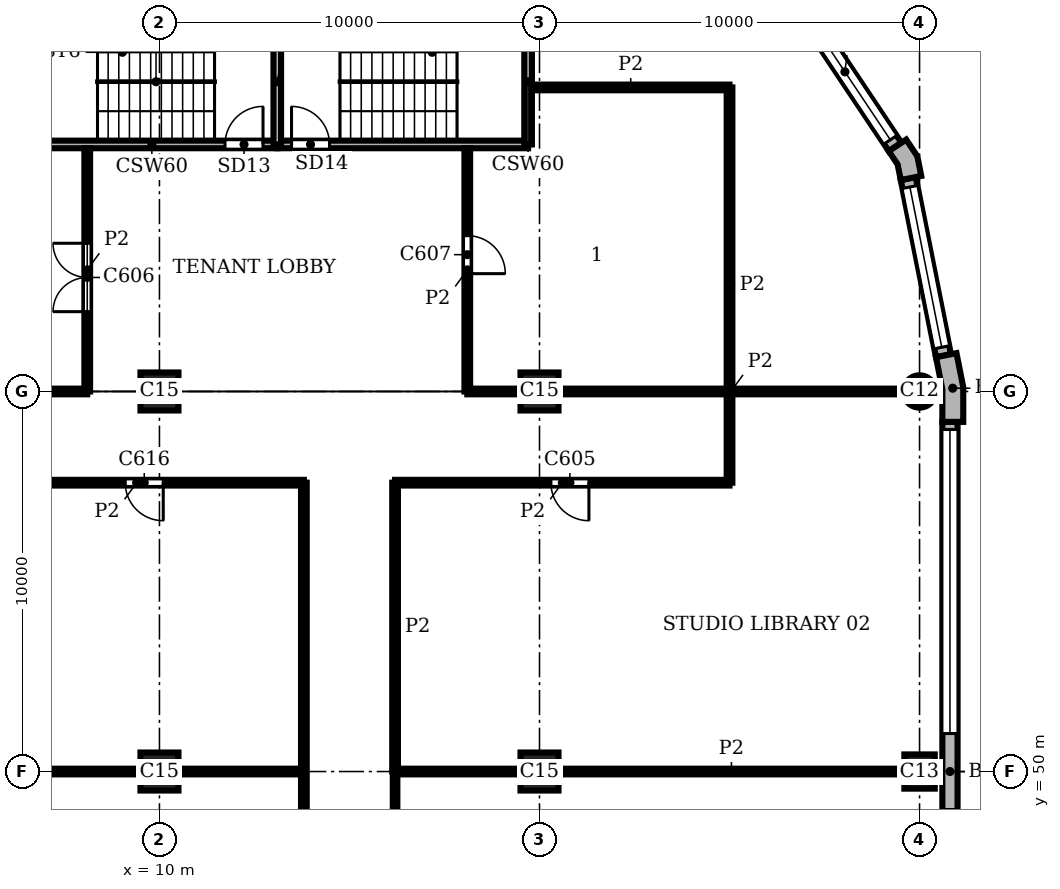
"""IFC4 building model, lengths in metres.
Left out: names, types, materials, properties, quantities, classifications, styles, units other than length and angle.
Written with IfcOpenShell. Run it as: python <this file> out.ifc"""

import sys

from ifc_helpers import new_model, si_unit, direction, frame, frame_2d, origin, origin_2d, place, context, subcontext, project, spatial, polyline, rectangle, circle, outline, extrude, element, fill, save


model = new_model("IFC4")
c1 = context("Model", 3, precision=1e-05, world=origin(), true_north=direction((0.0, 1.0)))
c2 = subcontext(c1, "Body", "Model", "MODEL_VIEW")
j1 = project(units=[si_unit("LENGTHUNIT", "METRE"), si_unit("PLANEANGLEUNIT", "RADIAN")], contexts=[c1])
p1 = place(None, origin())
s1 = spatial("IfcSite", under=j1, at=p1, CompositionType="ELEMENT")
p2 = place(p1, origin())
s2 = spatial("IfcBuilding", under=s1, at=p2, CompositionType="ELEMENT")
p3 = place(p2, frame((0.0, 0.0, 294.3)))
s3 = spatial("IfcBuildingStorey", under=s2, at=p3, CompositionType="ELEMENT", Elevation=294.3)
p4 = place(p3, frame((30.0, 50.0, 0.0), z_axis=(0.0, 0.0, 1.0), x_axis=(0.0, 1.0, 0.0)))
e1 = element("IfcColumn", 1, at=p4, inside=s3, PredefinedType="COLUMN", context=c2, shape_type="SweptSolid", body=[
    extrude(rectangle(XDim=0.9, YDim=0.8, at=origin_2d()), origin(), (0.0, 0.0, 1.0), 3.9),
])
p5 = place(p3, frame((30.0, 60.0, 0.0), z_axis=(0.0, 0.0, 1.0), x_axis=(1.0, 0.0, 0.0)))
e2 = element("IfcColumn", 2, at=p5, inside=s3, PredefinedType="COLUMN", context=c2, shape_type="SweptSolid", body=[
    extrude(circle(Radius=0.425, at=origin_2d()), origin(), (0.0, 0.0, 1.0), 3.9),
])
for number, where, z_axis, x_axis in (
    (3, (10.0, 50.0, 0.0), (0.0, 0.0, 1.0), (1.0, 0.0, 0.0)),
    (4, (10.0, 60.0, 0.0), (0.0, 0.0, 1.0), (1.0, 0.0, 0.0)),
    (5, (20.0, 50.0, 0.0), (0.0, 0.0, 1.0), (1.0, 0.0, 0.0)),
    (6, (20.0, 60.0, 0.0), (0.0, 0.0, 1.0), (1.0, 0.0, 0.0)),
):
    element("IfcColumn", number, at=place(p3, frame(where, z_axis=z_axis, x_axis=x_axis)), inside=s3, PredefinedType="COLUMN", context=c2, shape_type="SweptSolid", body=[
        extrude(rectangle(XDim=1.0, YDim=1.0, at=origin_2d()), origin(), (0.0, 0.0, 1.0), 3.9),
    ])
p6 = place(p3, origin())
e7 = element("IfcWall", 7, at=p6, inside=s3, PredefinedType="SOLIDWALL", context=c2, shape_type="SweptSolid", body=[
    extrude(outline(polyline([(31.0, 59.2), (31.15, 59.2), (31.15, 60.113), (30.972, 61.009), (30.825, 60.98), (30.432, 60.902), (30.6, 60.059), (30.6, 59.2), (31.0, 59.2)])), origin(), (0.0, 0.0, 1.0), 3.9),
])
e8 = element("IfcWall", 8, at=p6, inside=s3, PredefinedType="SOLIDWALL", context=c2, shape_type="SweptSolid", body=[
    extrude(outline(polyline([(29.897, 65.641), (30.045, 65.67), (29.941, 66.189), (29.648, 66.629), (29.523, 66.545), (29.19, 66.323), (29.423, 65.974), (29.505, 65.563), (29.897, 65.641)])), origin(), (0.0, 0.0, 1.0), 3.9),
])
p7 = place(p3, frame((30.8, 40.8, 0.0), z_axis=(0.0, 0.0, 1.0), x_axis=(0.0, 1.0, 0.0)))
e9 = element("IfcWall", 9, at=p7, inside=s3, PredefinedType="SOLIDWALL", context=c2, shape_type="SweptSolid", body=[
    extrude(rectangle(XDim=18.4, YDim=0.4, at=frame_2d((9.2, 0.0))), origin(), (0.0, 0.0, 1.0), 3.9),
])
p8 = place(p7, frame((0.2, 0.0, 0.9)))
e10 = element("IfcOpeningElement", 10, at=p8, cuts=e9, PredefinedType="OPENING", context=c2, shape_type="SweptSolid", body=[
    extrude(rectangle(XDim=8.0, YDim=2.35, at=frame_2d((4.0, 1.175))), frame((0.0, 0.21, 0.0), z_axis=(0.0, -1.0, 0.0), x_axis=(1.0, 0.0, 0.0)), (0.0, 0.0, 1.0), 0.42),
])
p9 = place(p7, frame((10.2, 0.0, 0.9)))
e11 = element("IfcOpeningElement", 11, at=p9, cuts=e9, PredefinedType="OPENING", context=c2, shape_type="SweptSolid", body=[
    extrude(rectangle(XDim=8.0, YDim=2.35, at=frame_2d((4.0, 1.175))), frame((0.0, 0.21, 0.0), z_axis=(0.0, -1.0, 0.0), x_axis=(1.0, 0.0, 0.0)), (0.0, 0.0, 1.0), 0.42),
])
p10 = place(p3, frame((30.629, 60.941, 0.0), z_axis=(0.0, 0.0, 1.0), x_axis=(-0.195098533057, 0.98078364709, 0.0)))
e12 = element("IfcWall", 12, at=p10, inside=s3, PredefinedType="SOLIDWALL", context=c2, shape_type="SweptSolid", body=[
    extrude(rectangle(XDim=4.753, YDim=0.4, at=frame_2d((2.376, 0.0))), origin(), (0.0, 0.0, 1.0), 3.9),
])
p11 = place(p10, frame((0.226, 0.0, 0.9)))
e13 = element("IfcOpeningElement", 13, at=p11, cuts=e12, PredefinedType="OPENING", context=c2, shape_type="SweptSolid", body=[
    extrude(rectangle(XDim=4.3, YDim=2.35, at=frame_2d((2.15, 1.175))), frame((0.0, 0.21, 0.0), z_axis=(0.0, -1.0, 0.0), x_axis=(1.0, 0.0, 0.0)), (0.0, 0.0, 1.0), 0.42),
])
p12 = place(p3, frame((29.357, 66.434, 0.0), z_axis=(0.0, 0.0, 1.0), x_axis=(-0.555541552266, 0.831488775454, 0.0)))
e14 = element("IfcWall", 14, at=p12, inside=s3, PredefinedType="SOLIDWALL", context=c2, shape_type="SweptSolid", body=[
    extrude(rectangle(XDim=4.753, YDim=0.4, at=frame_2d((2.376, 0.0))), origin(), (0.0, 0.0, 1.0), 3.9),
])
p13 = place(p12, frame((0.226, 0.0, 0.9)))
e15 = element("IfcOpeningElement", 15, at=p13, cuts=e14, PredefinedType="OPENING", context=c2, shape_type="SweptSolid", body=[
    extrude(rectangle(XDim=4.3, YDim=2.35, at=frame_2d((2.15, 1.175))), frame((0.0, 0.21, 0.0), z_axis=(0.0, -1.0, 0.0), x_axis=(1.0, 0.0, 0.0)), (0.0, 0.0, 1.0), 0.42),
])
p14 = place(p3, frame((6.5, 66.5, 0.0), z_axis=(0.0, 0.0, 1.0), x_axis=(1.0, 0.0, 0.0)))
e16 = element("IfcWall", 16, at=p14, inside=s3, PredefinedType="SHEAR", context=c2, shape_type="SweptSolid", body=[
    extrude(rectangle(XDim=6.6, YDim=0.2, at=frame_2d((3.3, 0.0))), origin(), (0.0, 0.0, 1.0), 3.58),
])
p15 = place(p14, frame((5.225, 0.0, 0.0)))
e17 = element("IfcOpeningElement", 17, at=p15, cuts=e16, PredefinedType="OPENING", context=c2, shape_type="SweptSolid", body=[
    extrude(rectangle(XDim=1.0, YDim=2.1, at=frame_2d((0.5, 1.05))), frame((0.0, 0.11, 0.0), z_axis=(0.0, -1.0, 0.0), x_axis=(1.0, 0.0, 0.0)), (0.0, 0.0, 1.0), 0.22),
])
p16 = place(p3, frame((13.1, 66.5, 0.0), z_axis=(0.0, 0.0, 1.0), x_axis=(1.0, 0.0, 0.0)))
e18 = element("IfcWall", 18, at=p16, inside=s3, PredefinedType="SHEAR", context=c2, shape_type="SweptSolid", body=[
    extrude(rectangle(XDim=6.6, YDim=0.2, at=frame_2d((3.3, 0.0))), origin(), (0.0, 0.0, 1.0), 3.58),
])
p17 = place(p16, frame((0.375, 0.0, 0.0)))
e19 = element("IfcOpeningElement", 19, at=p17, cuts=e18, PredefinedType="OPENING", context=c2, shape_type="SweptSolid", body=[
    extrude(rectangle(XDim=1.0, YDim=2.1, at=frame_2d((0.5, 1.05))), frame((0.0, 0.11, 0.0), z_axis=(0.0, -1.0, 0.0), x_axis=(1.0, 0.0, 0.0)), (0.0, 0.0, 1.0), 0.22),
])
for number, where, z_axis, x_axis in (
    (20, (13.1, 66.5, 0.0), (0.0, 0.0, 1.0), (0.0, 1.0, 0.0)),
    (21, (19.7, 66.5, 0.0), (0.0, 0.0, 1.0), (0.0, 1.0, 0.0)),
):
    element("IfcWall", number, at=place(p3, frame(where, z_axis=z_axis, x_axis=x_axis)), inside=s3, PredefinedType="SHEAR", context=c2, shape_type="SweptSolid", body=[
        extrude(rectangle(XDim=3.3, YDim=0.2, at=frame_2d((1.65, 0.0))), origin(), (0.0, 0.0, 1.0), 3.58),
    ])
p18 = place(p3, frame((8.1, 60.0, 0.0), z_axis=(0.0, 0.0, 1.0), x_axis=(0.0, 1.0, 0.0)))
e22 = element("IfcWall", 22, at=p18, inside=s3, PredefinedType="PARTITIONING", context=c2, shape_type="SweptSolid", body=[
    extrude(rectangle(XDim=6.4, YDim=0.15, at=frame_2d((3.2, 0.0))), origin(), (0.0, 0.0, 1.0), 3.58),
])
p19 = place(p18, frame((2.1, 0.0, 0.0)))
e23 = element("IfcOpeningElement", 23, at=p19, cuts=e22, PredefinedType="OPENING", context=c2, shape_type="SweptSolid", body=[
    extrude(rectangle(XDim=1.8, YDim=2.1, at=frame_2d((0.9, 1.05))), frame((0.0, 0.085, 0.0), z_axis=(0.0, -1.0, 0.0), x_axis=(1.0, 0.0, 0.0)), (0.0, 0.0, 1.0), 0.17),
])
p20 = place(p3, frame((13.8, 28.0, 0.0), z_axis=(0.0, 0.0, 1.0), x_axis=(0.0, 1.0, 0.0)))
e24 = element("IfcWall", 24, at=p20, inside=s3, PredefinedType="PARTITIONING", context=c2, shape_type="SweptSolid", body=[
    extrude(rectangle(XDim=29.6, YDim=0.15, at=frame_2d((14.8, 0.0))), origin(), (0.0, 0.0, 1.0), 3.58),
])
p21 = place(p20, frame((9.901, 0.0, 0.0)))
e25 = element("IfcOpeningElement", 25, at=p21, cuts=e24, PredefinedType="OPENING", context=c2, shape_type="SweptSolid", body=[
    extrude(rectangle(XDim=1.8, YDim=2.1, at=frame_2d((0.9, 1.05))), frame((0.0, 0.085, 0.0), z_axis=(0.0, -1.0, 0.0), x_axis=(1.0, 0.0, 0.0)), (0.0, 0.0, 1.0), 0.17),
])
p22 = place(p3, frame((16.2, 50.0, 0.0), z_axis=(0.0, 0.0, 1.0), x_axis=(0.0, 1.0, 0.0)))
e26 = element("IfcWall", 26, at=p22, inside=s3, PredefinedType="PARTITIONING", context=c2, shape_type="SweptSolid", body=[
    extrude(rectangle(XDim=7.6, YDim=0.15, at=frame_2d((3.8, 0.0))), origin(), (0.0, 0.0, 1.0), 3.58),
])
p23 = place(p3, frame((18.1, 60.0, 0.0), z_axis=(0.0, 0.0, 1.0), x_axis=(0.0, 1.0, 0.0)))
e27 = element("IfcWall", 27, at=p23, inside=s3, PredefinedType="PARTITIONING", context=c2, shape_type="SweptSolid", body=[
    extrude(rectangle(XDim=6.4, YDim=0.15, at=frame_2d((3.2, 0.0))), origin(), (0.0, 0.0, 1.0), 3.58),
])
p24 = place(p23, frame((3.1, 0.0, 0.0)))
e28 = element("IfcOpeningElement", 28, at=p24, cuts=e27, PredefinedType="OPENING", context=c2, shape_type="SweptSolid", body=[
    extrude(rectangle(XDim=1.0, YDim=2.1, at=frame_2d((0.5, 1.05))), frame((0.0, 0.085, 0.0), z_axis=(0.0, -1.0, 0.0), x_axis=(1.0, 0.0, 0.0)), (0.0, 0.0, 1.0), 0.17),
])
p25 = place(p3, frame((25.0, 57.6, 0.0), z_axis=(0.0, 0.0, 1.0), x_axis=(0.0, 1.0, 0.0)))
e29 = element("IfcWall", 29, at=p25, inside=s3, PredefinedType="PARTITIONING", context=c2, shape_type="SweptSolid", body=[
    extrude(rectangle(XDim=10.4, YDim=0.15, at=frame_2d((5.2, 0.0))), origin(), (0.0, 0.0, 1.0), 3.58),
])
p26 = place(p3, frame((0.4, 50.0, 0.0), z_axis=(0.0, 0.0, 1.0), x_axis=(1.0, 0.0, 0.0)))
e30 = element("IfcWall", 30, at=p26, inside=s3, PredefinedType="PARTITIONING", context=c2, shape_type="SweptSolid", body=[
    extrude(rectangle(XDim=9.1, YDim=0.15, at=frame_2d((4.55, 0.0))), origin(), (0.0, 0.0, 1.0), 3.58),
])
for number, where, z_axis, x_axis in (
    (31, (10.5, 50.0, 0.0), (0.0, 0.0, 1.0), (1.0, 0.0, 0.0)),
    (32, (16.2, 50.0, 0.0), (0.0, 0.0, 1.0), (1.0, 0.0, 0.0)),
):
    element("IfcWall", number, at=place(p3, frame(where, z_axis=z_axis, x_axis=x_axis)), inside=s3, PredefinedType="PARTITIONING", context=c2, shape_type="SweptSolid", body=[
        extrude(rectangle(XDim=3.3, YDim=0.15, at=frame_2d((1.65, 0.0))), origin(), (0.0, 0.0, 1.0), 3.58),
    ])
p27 = place(p3, frame((20.5, 50.0, 0.0), z_axis=(0.0, 0.0, 1.0), x_axis=(1.0, 0.0, 0.0)))
e33 = element("IfcWall", 33, at=p27, inside=s3, PredefinedType="PARTITIONING", context=c2, shape_type="SweptSolid", body=[
    extrude(rectangle(XDim=9.1, YDim=0.15, at=frame_2d((4.55, 0.0))), origin(), (0.0, 0.0, 1.0), 3.58),
])
p28 = place(p3, frame((5.0, 57.6, 0.0), z_axis=(0.0, 0.0, 1.0), x_axis=(1.0, 0.0, 0.0)))
e34 = element("IfcWall", 34, at=p28, inside=s3, PredefinedType="PARTITIONING", context=c2, shape_type="SweptSolid", body=[
    extrude(rectangle(XDim=8.8, YDim=0.15, at=frame_2d((4.4, 0.0))), origin(), (0.0, 0.0, 1.0), 3.58),
])
p29 = place(p28, frame((4.1, 0.0, 0.0)))
e35 = element("IfcOpeningElement", 35, at=p29, cuts=e34, PredefinedType="OPENING", context=c2, shape_type="SweptSolid", body=[
    extrude(rectangle(XDim=1.0, YDim=2.1, at=frame_2d((0.5, 1.05))), frame((0.0, 0.085, 0.0), z_axis=(0.0, -1.0, 0.0), x_axis=(1.0, 0.0, 0.0)), (0.0, 0.0, 1.0), 0.17),
])
p30 = place(p3, frame((16.2, 57.6, 0.0), z_axis=(0.0, 0.0, 1.0), x_axis=(1.0, 0.0, 0.0)))
e36 = element("IfcWall", 36, at=p30, inside=s3, PredefinedType="PARTITIONING", context=c2, shape_type="SweptSolid", body=[
    extrude(rectangle(XDim=8.8, YDim=0.15, at=frame_2d((4.4, 0.0))), origin(), (0.0, 0.0, 1.0), 3.58),
])
p31 = place(p30, frame((4.1, 0.0, 0.0)))
e37 = element("IfcOpeningElement", 37, at=p31, cuts=e36, PredefinedType="OPENING", context=c2, shape_type="SweptSolid", body=[
    extrude(rectangle(XDim=1.0, YDim=2.1, at=frame_2d((0.5, 1.05))), frame((0.0, 0.085, 0.0), z_axis=(0.0, -1.0, 0.0), x_axis=(1.0, 0.0, 0.0)), (0.0, 0.0, 1.0), 0.17),
])
p32 = place(p3, frame((0.425, 60.0, 0.0), z_axis=(0.0, 0.0, 1.0), x_axis=(1.0, 0.0, 0.0)))
e38 = element("IfcWall", 38, at=p32, inside=s3, PredefinedType="PARTITIONING", context=c2, shape_type="SweptSolid", body=[
    extrude(rectangle(XDim=7.675, YDim=0.15, at=frame_2d((3.837, 0.0))), origin(), (0.0, 0.0, 1.0), 3.58),
])
p33 = place(p3, frame((18.1, 60.0, 0.0), z_axis=(0.0, 0.0, 1.0), x_axis=(1.0, 0.0, 0.0)))
e39 = element("IfcWall", 39, at=p33, inside=s3, PredefinedType="PARTITIONING", context=c2, shape_type="SweptSolid", body=[
    extrude(rectangle(XDim=1.4, YDim=0.15, at=frame_2d((0.7, 0.0))), origin(), (0.0, 0.0, 1.0), 3.58),
])
p34 = place(p3, frame((20.5, 60.0, 0.0), z_axis=(0.0, 0.0, 1.0), x_axis=(1.0, 0.0, 0.0)))
e40 = element("IfcWall", 40, at=p34, inside=s3, PredefinedType="PARTITIONING", context=c2, shape_type="SweptSolid", body=[
    extrude(rectangle(XDim=9.075, YDim=0.15, at=frame_2d((4.538, 0.0))), origin(), (0.0, 0.0, 1.0), 3.58),
])
p35 = place(p3, frame((19.8, 68.0, 0.0), z_axis=(0.0, 0.0, 1.0), x_axis=(1.0, 0.0, 0.0)))
e41 = element("IfcWall", 41, at=p35, inside=s3, PredefinedType="PARTITIONING", context=c2, shape_type="SweptSolid", body=[
    extrude(rectangle(XDim=5.2, YDim=0.15, at=frame_2d((2.6, 0.0))), origin(), (0.0, 0.0, 1.0), 3.58),
])
p36 = place(p3, frame((16.2, 40.0, 0.0), z_axis=(0.0, 0.0, 1.0), x_axis=(0.0, 1.0, 0.0)))
e42 = element("IfcWall", 42, at=p36, inside=s3, PredefinedType="PARTITIONING", context=c2, shape_type="SweptSolid", body=[
    extrude(rectangle(XDim=10.0, YDim=0.12, at=frame_2d((5.0, 0.0))), origin(), (0.0, 0.0, 1.0), 3.58),
])
p37 = place(p36, frame((4.1, 0.0, 0.0)))
e43 = element("IfcOpeningElement", 43, at=p37, cuts=e42, PredefinedType="OPENING", context=c2, shape_type="SweptSolid", body=[
    extrude(rectangle(XDim=1.0, YDim=2.1, at=frame_2d((0.5, 1.05))), frame((0.0, 0.07, 0.0), z_axis=(0.0, -1.0, 0.0), x_axis=(1.0, 0.0, 0.0)), (0.0, 0.0, 1.0), 0.14),
])
p38 = place(p9, origin())
e44 = element("IfcWindow", 44, at=p38, inside=s3, PartitioningType="SINGLE_PANEL", PredefinedType="WINDOW", context=c2, shape_type="SweptSolid", body=[
    extrude(rectangle(XDim=8.0, YDim=2.35, at=frame_2d((4.0, 1.175))), frame((0.0, 0.16, 0.0), z_axis=(0.0, -1.0, 0.0), x_axis=(1.0, 0.0, 0.0)), (0.0, 0.0, 1.0), 0.06),
])
fill(e11, e44)
p39 = place(p11, origin())
e45 = element("IfcWindow", 45, at=p39, inside=s3, PartitioningType="SINGLE_PANEL", PredefinedType="WINDOW", context=c2, shape_type="SweptSolid", body=[
    extrude(rectangle(XDim=4.3, YDim=2.35, at=frame_2d((2.15, 1.175))), frame((0.0, 0.16, 0.0), z_axis=(0.0, -1.0, 0.0), x_axis=(1.0, 0.0, 0.0)), (0.0, 0.0, 1.0), 0.06),
])
fill(e13, e45)
p40 = place(p13, origin())
e46 = element("IfcWindow", 46, at=p40, inside=s3, PartitioningType="SINGLE_PANEL", PredefinedType="WINDOW", context=c2, shape_type="SweptSolid", body=[
    extrude(rectangle(XDim=4.3, YDim=2.35, at=frame_2d((2.15, 1.175))), frame((0.0, 0.16, 0.0), z_axis=(0.0, -1.0, 0.0), x_axis=(1.0, 0.0, 0.0)), (0.0, 0.0, 1.0), 0.06),
])
fill(e15, e46)
p41 = place(p15, origin())
e47 = element("IfcDoor", 47, at=p41, inside=s3, OperationType="SINGLE_SWING_RIGHT", PredefinedType="DOOR", context=c2, shape_type="SweptSolid", body=[
    extrude(rectangle(XDim=1.0, YDim=2.1, at=frame_2d((0.5, 1.05))), frame((0.0, 0.025, 0.0), z_axis=(0.0, -1.0, 0.0), x_axis=(1.0, 0.0, 0.0)), (0.0, 0.0, 1.0), 0.05),
])
fill(e17, e47)
p42 = place(p17, origin())
e48 = element("IfcDoor", 48, at=p42, inside=s3, OperationType="SINGLE_SWING_LEFT", PredefinedType="DOOR", context=c2, shape_type="SweptSolid", body=[
    extrude(rectangle(XDim=1.0, YDim=2.1, at=frame_2d((0.5, 1.05))), frame((0.0, 0.025, 0.0), z_axis=(0.0, -1.0, 0.0), x_axis=(1.0, 0.0, 0.0)), (0.0, 0.0, 1.0), 0.05),
])
fill(e19, e48)
p43 = place(p31, frame((1.0, 0.0, 0.0), z_axis=(0.0, 0.0, 1.0), x_axis=(-1.0, 0.0, 0.0)))
e49 = element("IfcDoor", 49, at=p43, inside=s3, OperationType="SINGLE_SWING_LEFT", PredefinedType="DOOR", context=c2, shape_type="SweptSolid", body=[
    extrude(rectangle(XDim=1.0, YDim=2.1, at=frame_2d((0.5, 1.05))), frame((0.0, 0.025, 0.0), z_axis=(0.0, -1.0, 0.0), x_axis=(1.0, 0.0, 0.0)), (0.0, 0.0, 1.0), 0.05),
])
fill(e37, e49)
p44 = place(p19, origin())
e50 = element("IfcDoor", 50, at=p44, inside=s3, OperationType="DOUBLE_DOOR_SINGLE_SWING", PredefinedType="DOOR", context=c2, shape_type="SweptSolid", body=[
    extrude(rectangle(XDim=1.8, YDim=2.1, at=frame_2d((0.9, 1.05))), frame((0.0, 0.025, 0.0), z_axis=(0.0, -1.0, 0.0), x_axis=(1.0, 0.0, 0.0)), (0.0, 0.0, 1.0), 0.05),
])
fill(e23, e50)
p45 = place(p24, frame((1.0, 0.0, 0.0), z_axis=(0.0, 0.0, 1.0), x_axis=(-1.0, 0.0, 0.0)))
e51 = element("IfcDoor", 51, at=p45, inside=s3, OperationType="SINGLE_SWING_RIGHT", PredefinedType="DOOR", context=c2, shape_type="SweptSolid", body=[
    extrude(rectangle(XDim=1.0, YDim=2.1, at=frame_2d((0.5, 1.05))), frame((0.0, 0.025, 0.0), z_axis=(0.0, -1.0, 0.0), x_axis=(1.0, 0.0, 0.0)), (0.0, 0.0, 1.0), 0.05),
])
fill(e28, e51)
p46 = place(p29, frame((1.0, 0.0, 0.0), z_axis=(0.0, 0.0, 1.0), x_axis=(-1.0, 0.0, 0.0)))
e52 = element("IfcDoor", 52, at=p46, inside=s3, OperationType="SINGLE_SWING_LEFT", PredefinedType="DOOR", context=c2, shape_type="SweptSolid", body=[
    extrude(rectangle(XDim=1.0, YDim=2.1, at=frame_2d((0.5, 1.05))), frame((0.0, 0.025, 0.0), z_axis=(0.0, -1.0, 0.0), x_axis=(1.0, 0.0, 0.0)), (0.0, 0.0, 1.0), 0.05),
])
fill(e35, e52)
save(model, sys.argv[1])
